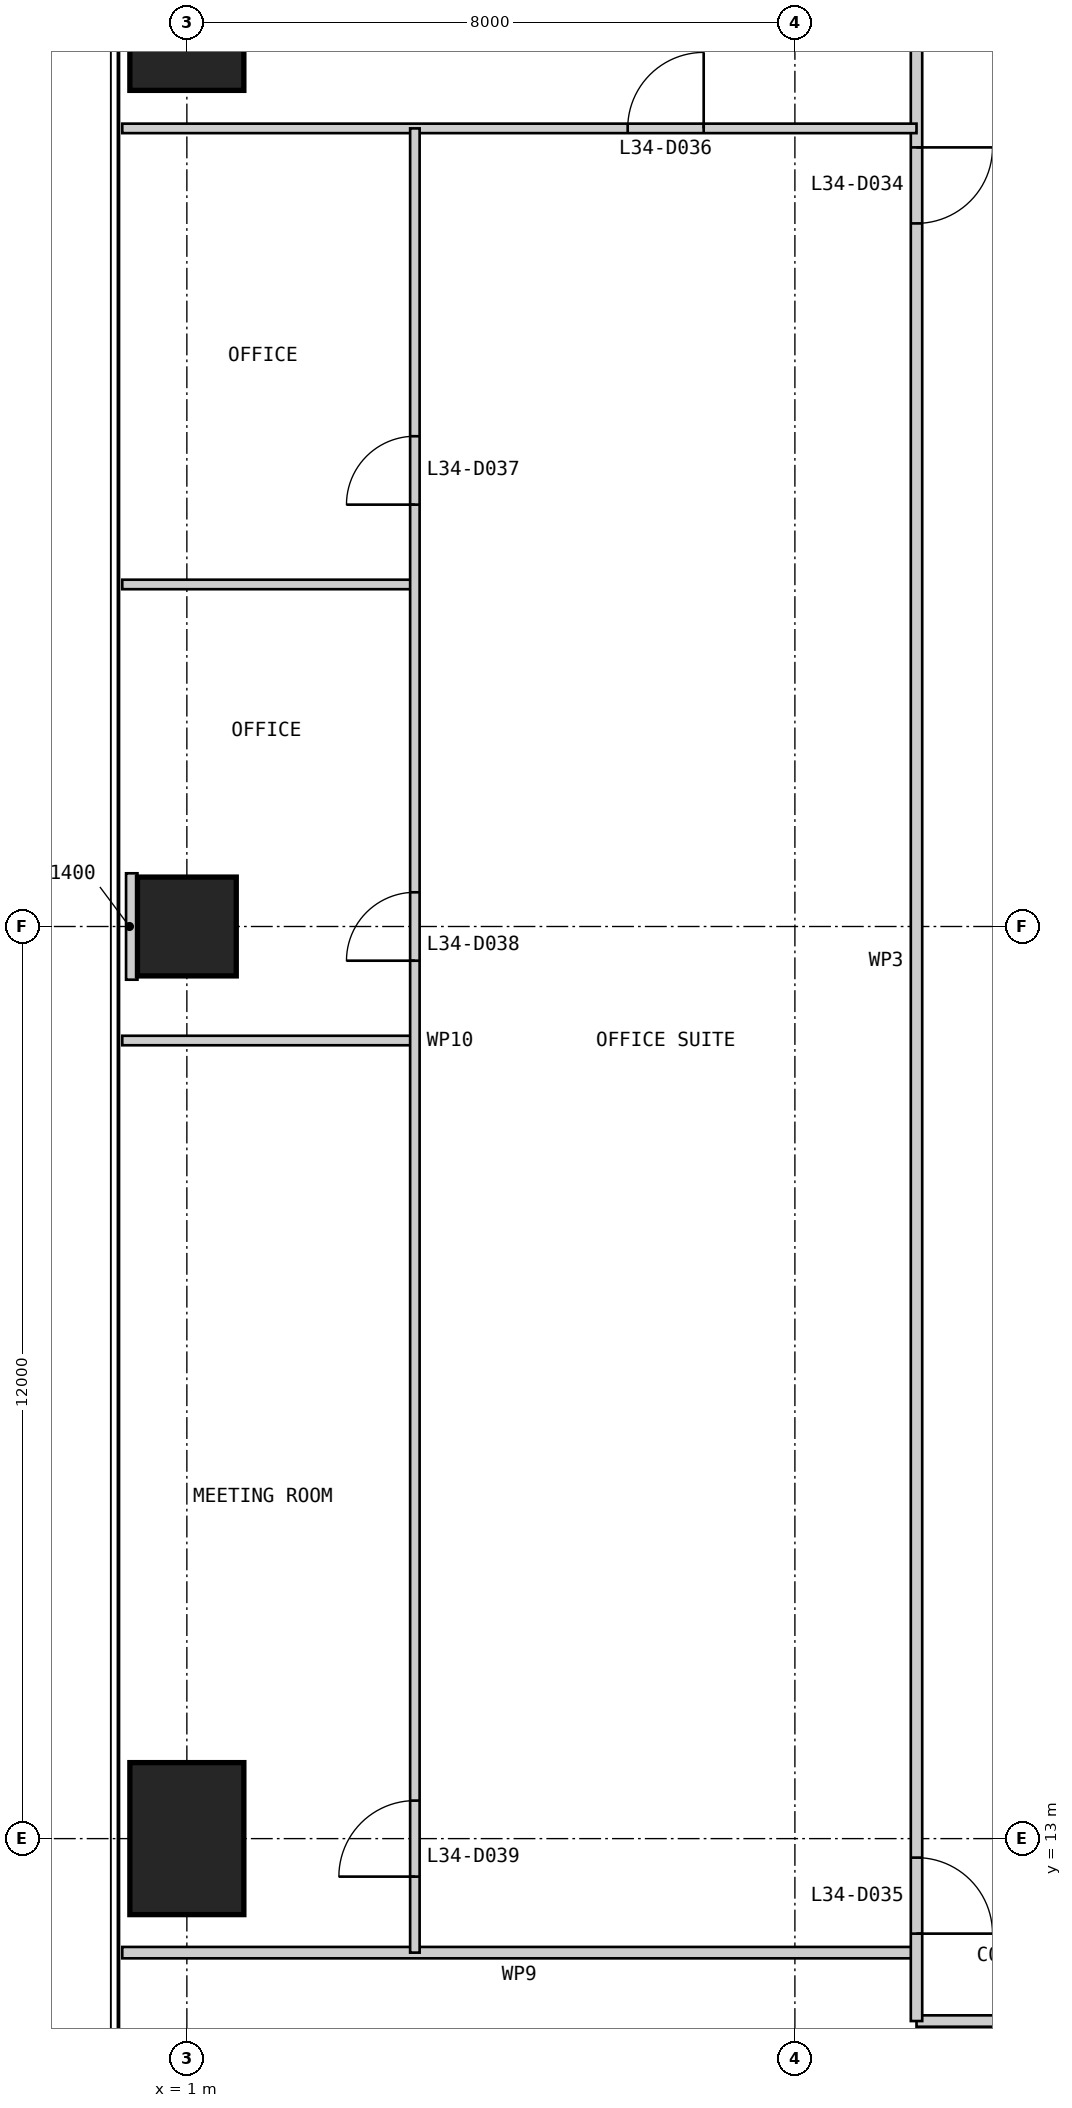
"""IFC4 building model, lengths in metres.
Left out: names, types, materials, properties, quantities, classifications, styles, units other than length and angle.
Written with IfcOpenShell. Run it as: python <this file> out.ifc"""

import sys

from ifc_helpers import new_model, si_unit, direction, frame, frame_2d, origin, origin_2d, place, context, subcontext, project, spatial, rectangle, extrude, element, fill, save


model = new_model("IFC4")
c1 = context("Model", 3, precision=1e-05, world=origin(), true_north=direction((0.0, 1.0)))
c2 = subcontext(c1, "Body", "Model", "MODEL_VIEW")
j1 = project(units=[si_unit("LENGTHUNIT", "METRE"), si_unit("PLANEANGLEUNIT", "RADIAN")], contexts=[c1])
p1 = place(None, origin())
s1 = spatial("IfcSite", under=j1, at=p1, CompositionType="ELEMENT")
p2 = place(p1, origin())
s2 = spatial("IfcBuilding", under=s1, at=p2, CompositionType="ELEMENT")
p3 = place(p2, frame((0.0, 0.0, 146.4)))
s3 = spatial("IfcBuildingStorey", under=s2, at=p3, CompositionType="ELEMENT", Elevation=146.4)
p4 = place(p3, frame((1.0, 37.0, 0.0), z_axis=(0.0, 0.0, 1.0), x_axis=(1.0, 0.0, 0.0)))
e1 = element("IfcColumn", 1, at=p4, inside=s3, PredefinedType="COLUMN", context=c2, shape_type="SweptSolid", body=[
    extrude(rectangle(XDim=1.5, YDim=2.0, at=origin_2d()), origin(), (0.0, 0.0, 1.0), 4.0),
])
p5 = place(p3, frame((1.0, 25.0, 0.0), z_axis=(0.0, 0.0, 1.0), x_axis=(1.0, 0.0, 0.0)))
e2 = element("IfcColumn", 2, at=p5, inside=s3, PredefinedType="COLUMN", context=c2, shape_type="SweptSolid", body=[
    extrude(rectangle(XDim=1.3, YDim=1.3, at=origin_2d()), origin(), (0.0, 0.0, 1.0), 4.0),
])
p6 = place(p3, frame((1.0, 13.0, 0.0), z_axis=(0.0, 0.0, 1.0), x_axis=(1.0, 0.0, 0.0)))
e3 = element("IfcColumn", 3, at=p6, inside=s3, PredefinedType="COLUMN", context=c2, shape_type="SweptSolid", body=[
    extrude(rectangle(XDim=1.5, YDim=2.0, at=origin_2d()), origin(), (0.0, 0.0, 1.0), 4.0),
])
p7 = place(p3, frame((10.6, 10.6, 0.0), z_axis=(0.0, 0.0, 1.0), x_axis=(1.0, 0.0, 0.0)))
e4 = element("IfcWall", 4, at=p7, inside=s3, PredefinedType="PARTITIONING", context=c2, shape_type="SweptSolid", body=[
    extrude(rectangle(XDim=28.8, YDim=0.15, at=frame_2d((14.4, 0.0))), origin(), (0.0, 0.0, 1.0), 3.85),
])
p8 = place(p7, frame((4.15, 0.0, 0.0)))
e5 = element("IfcOpeningElement", 5, at=p8, cuts=e4, PredefinedType="OPENING", context=c2, shape_type="SweptSolid", body=[
    extrude(rectangle(XDim=1.0, YDim=2.2, at=frame_2d((0.5, 1.1))), frame((0.0, 0.085, 0.0), z_axis=(0.0, -1.0, 0.0), x_axis=(1.0, 0.0, 0.0)), (0.0, 0.0, 1.0), 0.17),
])
p9 = place(p7, frame((26.65, 0.0, 0.0)))
e6 = element("IfcOpeningElement", 6, at=p9, cuts=e4, PredefinedType="OPENING", context=c2, shape_type="SweptSolid", body=[
    extrude(rectangle(XDim=1.0, YDim=2.2, at=frame_2d((0.5, 1.1))), frame((0.0, 0.085, 0.0), z_axis=(0.0, -1.0, 0.0), x_axis=(1.0, 0.0, 0.0)), (0.0, 0.0, 1.0), 0.17),
])
p10 = place(p3, frame((0.15, 11.5, 0.0), z_axis=(0.0, 0.0, 1.0), x_axis=(1.0, 0.0, 0.0)))
e7 = element("IfcWall", 7, at=p10, inside=s3, PredefinedType="PARTITIONING", context=c2, shape_type="SweptSolid", body=[
    extrude(rectangle(XDim=10.45, YDim=0.15, at=frame_2d((5.225, 0.0))), origin(), (0.0, 0.0, 1.0), 3.85),
])
p11 = place(p3, frame((10.6, 38.5, 0.0), z_axis=(0.0, 0.0, 1.0), x_axis=(0.0, -1.0, 0.0)))
e8 = element("IfcWall", 8, at=p11, inside=s3, PredefinedType="PARTITIONING", context=c2, shape_type="SweptSolid", body=[
    extrude(rectangle(XDim=27.9, YDim=0.15, at=frame_2d((13.95, 0.0))), origin(), (0.0, 0.0, 1.0), 3.85),
])
p12 = place(p11, frame((3.25, 0.0, 0.0)))
e9 = element("IfcOpeningElement", 9, at=p12, cuts=e8, PredefinedType="OPENING", context=c2, shape_type="SweptSolid", body=[
    extrude(rectangle(XDim=1.0, YDim=2.2, at=frame_2d((0.5, 1.1))), frame((0.0, 0.085, 0.0), z_axis=(0.0, -1.0, 0.0), x_axis=(1.0, 0.0, 0.0)), (0.0, 0.0, 1.0), 0.17),
])
p13 = place(p11, frame((25.75, 0.0, 0.0)))
e10 = element("IfcOpeningElement", 10, at=p13, cuts=e8, PredefinedType="OPENING", context=c2, shape_type="SweptSolid", body=[
    extrude(rectangle(XDim=1.0, YDim=2.2, at=frame_2d((0.5, 1.1))), frame((0.0, 0.085, 0.0), z_axis=(0.0, -1.0, 0.0), x_axis=(1.0, 0.0, 0.0)), (0.0, 0.0, 1.0), 0.17),
])
p14 = place(p3, frame((0.15, 35.5, 0.0), z_axis=(0.0, 0.0, 1.0), x_axis=(1.0, 0.0, 0.0)))
e11 = element("IfcWall", 11, at=p14, inside=s3, PredefinedType="PARTITIONING", context=c2, shape_type="SweptSolid", body=[
    extrude(rectangle(XDim=10.45, YDim=0.125, at=frame_2d((5.225, 0.0))), origin(), (0.0, 0.0, 1.0), 3.85),
])
p15 = place(p14, frame((6.65, 0.0, 0.0)))
e12 = element("IfcOpeningElement", 12, at=p15, cuts=e11, PredefinedType="OPENING", context=c2, shape_type="SweptSolid", body=[
    extrude(rectangle(XDim=1.0, YDim=2.2, at=frame_2d((0.5, 1.1))), frame((0.0, 0.073, 0.0), z_axis=(0.0, -1.0, 0.0), x_axis=(1.0, 0.0, 0.0)), (0.0, 0.0, 1.0), 0.145),
])
for number, where, z_axis, x_axis in (
    (13, (0.15, 29.5, 0.0), (0.0, 0.0, 1.0), (1.0, 0.0, 0.0)),
    (14, (0.15, 23.5, 0.0), (0.0, 0.0, 1.0), (1.0, 0.0, 0.0)),
):
    element("IfcWall", number, at=place(p3, frame(where, z_axis=z_axis, x_axis=x_axis)), inside=s3, PredefinedType="PARTITIONING", context=c2, shape_type="SweptSolid", body=[
        extrude(rectangle(XDim=3.85, YDim=0.125, at=frame_2d((1.925, 0.0))), origin(), (0.0, 0.0, 1.0), 3.85),
    ])
p16 = place(p3, frame((4.0, 35.5, 0.0), z_axis=(0.0, 0.0, 1.0), x_axis=(0.0, -1.0, 0.0)))
e15 = element("IfcWall", 15, at=p16, inside=s3, PredefinedType="PARTITIONING", context=c2, shape_type="SweptSolid", body=[
    extrude(rectangle(XDim=24.0, YDim=0.125, at=frame_2d((12.0, 0.0))), origin(), (0.0, 0.0, 1.0), 3.238),
])
p17 = place(p16, frame((4.05, 0.0, 0.0)))
e16 = element("IfcOpeningElement", 16, at=p17, cuts=e15, PredefinedType="OPENING", context=c2, shape_type="SweptSolid", body=[
    extrude(rectangle(XDim=0.9, YDim=2.2, at=frame_2d((0.45, 1.1))), frame((0.0, 0.073, 0.0), z_axis=(0.0, -1.0, 0.0), x_axis=(1.0, 0.0, 0.0)), (0.0, 0.0, 1.0), 0.145),
])
p18 = place(p16, frame((10.05, 0.0, 0.0)))
e17 = element("IfcOpeningElement", 17, at=p18, cuts=e15, PredefinedType="OPENING", context=c2, shape_type="SweptSolid", body=[
    extrude(rectangle(XDim=0.9, YDim=2.2, at=frame_2d((0.45, 1.1))), frame((0.0, 0.073, 0.0), z_axis=(0.0, -1.0, 0.0), x_axis=(1.0, 0.0, 0.0)), (0.0, 0.0, 1.0), 0.145),
])
p19 = place(p16, frame((22.0, 0.0, 0.0)))
e18 = element("IfcOpeningElement", 18, at=p19, cuts=e15, PredefinedType="OPENING", context=c2, shape_type="SweptSolid", body=[
    extrude(rectangle(XDim=1.0, YDim=2.2, at=frame_2d((0.5, 1.1))), frame((0.0, 0.073, 0.0), z_axis=(0.0, -1.0, 0.0), x_axis=(1.0, 0.0, 0.0)), (0.0, 0.0, 1.0), 0.145),
])
p20 = place(p3, frame((0.2, 25.0, 0.0), z_axis=(0.0, 0.0, 1.0), x_axis=(1.0, 0.0, 0.0)))
e19 = element("IfcWall", 19, at=p20, inside=s3, PredefinedType="PARTITIONING", context=c2, shape_type="SweptSolid", body=[
    extrude(rectangle(XDim=0.15, YDim=1.4, at=frame_2d((0.075, 0.0))), origin(), (0.0, 0.0, 1.0), 3.85),
])
p21 = place(p12, origin())
e20 = element("IfcDoor", 20, at=p21, inside=s3, OperationType="SINGLE_SWING_LEFT", PredefinedType="DOOR", context=c2, shape_type="SweptSolid", body=[
    extrude(rectangle(XDim=1.0, YDim=2.2, at=frame_2d((0.5, 1.1))), frame((0.0, 0.025, 0.0), z_axis=(0.0, -1.0, 0.0), x_axis=(1.0, 0.0, 0.0)), (0.0, 0.0, 1.0), 0.05),
])
fill(e9, e20)
p22 = place(p13, origin())
e21 = element("IfcDoor", 21, at=p22, inside=s3, OperationType="SINGLE_SWING_RIGHT", PredefinedType="DOOR", context=c2, shape_type="SweptSolid", body=[
    extrude(rectangle(XDim=1.0, YDim=2.2, at=frame_2d((0.5, 1.1))), frame((0.0, 0.025, 0.0), z_axis=(0.0, -1.0, 0.0), x_axis=(1.0, 0.0, 0.0)), (0.0, 0.0, 1.0), 0.05),
])
fill(e10, e21)
p23 = place(p15, origin())
e22 = element("IfcDoor", 22, at=p23, inside=s3, OperationType="SINGLE_SWING_RIGHT", PredefinedType="DOOR", context=c2, shape_type="SweptSolid", body=[
    extrude(rectangle(XDim=1.0, YDim=2.2, at=frame_2d((0.5, 1.1))), frame((0.0, 0.025, 0.0), z_axis=(0.0, -1.0, 0.0), x_axis=(1.0, 0.0, 0.0)), (0.0, 0.0, 1.0), 0.05),
])
fill(e12, e22)
p24 = place(p17, frame((0.9, 0.0, 0.0), z_axis=(0.0, 0.0, 1.0), x_axis=(-1.0, 0.0, 0.0)))
e23 = element("IfcDoor", 23, at=p24, inside=s3, OperationType="SINGLE_SWING_LEFT", PredefinedType="DOOR", context=c2, shape_type="SweptSolid", body=[
    extrude(rectangle(XDim=0.9, YDim=2.2, at=frame_2d((0.45, 1.1))), frame((0.0, 0.025, 0.0), z_axis=(0.0, -1.0, 0.0), x_axis=(1.0, 0.0, 0.0)), (0.0, 0.0, 1.0), 0.05),
])
fill(e16, e23)
p25 = place(p18, frame((0.9, 0.0, 0.0), z_axis=(0.0, 0.0, 1.0), x_axis=(-1.0, 0.0, 0.0)))
e24 = element("IfcDoor", 24, at=p25, inside=s3, OperationType="SINGLE_SWING_LEFT", PredefinedType="DOOR", context=c2, shape_type="SweptSolid", body=[
    extrude(rectangle(XDim=0.9, YDim=2.2, at=frame_2d((0.45, 1.1))), frame((0.0, 0.025, 0.0), z_axis=(0.0, -1.0, 0.0), x_axis=(1.0, 0.0, 0.0)), (0.0, 0.0, 1.0), 0.05),
])
fill(e17, e24)
p26 = place(p19, frame((1.0, 0.0, 0.0), z_axis=(0.0, 0.0, 1.0), x_axis=(-1.0, 0.0, 0.0)))
e25 = element("IfcDoor", 25, at=p26, inside=s3, OperationType="SINGLE_SWING_LEFT", PredefinedType="DOOR", context=c2, shape_type="SweptSolid", body=[
    extrude(rectangle(XDim=1.0, YDim=2.2, at=frame_2d((0.5, 1.1))), frame((0.0, 0.025, 0.0), z_axis=(0.0, -1.0, 0.0), x_axis=(1.0, 0.0, 0.0)), (0.0, 0.0, 1.0), 0.05),
])
fill(e18, e25)
save(model, sys.argv[1])
